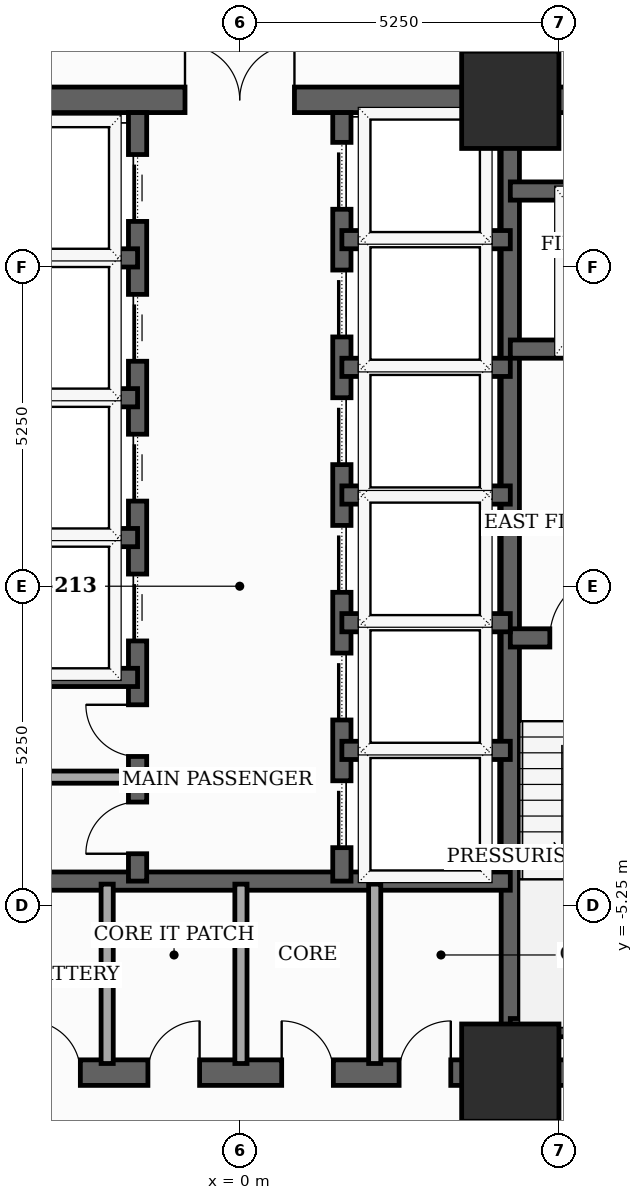
"""IFC4 building model, lengths in metres.
Left out: names, types, materials, properties, quantities, classifications, styles, units other than length and angle.
Written with IfcOpenShell. Run it as: python <this file> out.ifc"""

import sys

from ifc_helpers import new_model, si_unit, direction, frame, frame_2d, origin, origin_2d, place, context, subcontext, project, spatial, rectangle, extrude, element, fill, save


model = new_model("IFC4")
c1 = context("Model", 3, precision=1e-05, world=origin(), true_north=direction((0.0, 1.0)))
c2 = subcontext(c1, "Body", "Model", "MODEL_VIEW")
j1 = project(units=[si_unit("LENGTHUNIT", "METRE"), si_unit("PLANEANGLEUNIT", "RADIAN")], contexts=[c1])
p1 = place(None, origin())
s1 = spatial("IfcSite", under=j1, at=p1, CompositionType="ELEMENT")
p2 = place(p1, origin())
s2 = spatial("IfcBuilding", under=s1, at=p2, CompositionType="ELEMENT")
p3 = place(p2, frame((0.0, 0.0, 48.2)))
s3 = spatial("IfcBuildingStorey", under=s2, at=p3, CompositionType="ELEMENT", Elevation=48.2)
for number, where, z_axis, x_axis in (
    (1, (4.45, -8.0, 0.0), (0.0, 0.0, 1.0), (1.0, 0.0, 0.0)),
    (2, (4.45, 8.0, 0.0), (0.0, 0.0, 1.0), (1.0, 0.0, 0.0)),
):
    element("IfcColumn", number, at=place(p3, frame(where, z_axis=z_axis, x_axis=x_axis)), inside=s3, PredefinedType="COLUMN", context=c2, shape_type="SweptSolid", body=[
        extrude(rectangle(XDim=1.6, YDim=1.6, at=origin_2d()), origin(), (0.0, 0.0, 1.0), 3.7),
    ])
p4 = place(p3, frame((-8.0, -8.0, 0.0), z_axis=(0.0, 0.0, 1.0), x_axis=(1.0, 0.0, 0.0)))
e3 = element("IfcWall", 3, at=p4, inside=s3, PredefinedType="SHEAR", context=c2, shape_type="SweptSolid", body=[
    extrude(rectangle(XDim=16.0, YDim=0.42, at=frame_2d((8.0, 0.0))), origin(), (0.0, 0.0, 1.0), 3.5),
])
p5 = place(p4, frame((4.529, 0.0, 0.0)))
e4 = element("IfcOpeningElement", 4, at=p5, cuts=e3, PredefinedType="OPENING", context=c2, shape_type="SweptSolid", body=[
    extrude(rectangle(XDim=0.85, YDim=2.02, at=frame_2d((0.425, 1.01))), frame((0.0, 0.22, 0.0), z_axis=(0.0, -1.0, 0.0), x_axis=(1.0, 0.0, 0.0)), (0.0, 0.0, 1.0), 0.44),
])
p6 = place(p4, frame((6.49, 0.0, 0.0)))
e5 = element("IfcOpeningElement", 5, at=p6, cuts=e3, PredefinedType="OPENING", context=c2, shape_type="SweptSolid", body=[
    extrude(rectangle(XDim=0.85, YDim=2.02, at=frame_2d((0.425, 1.01))), frame((0.0, 0.22, 0.0), z_axis=(0.0, -1.0, 0.0), x_axis=(1.0, 0.0, 0.0)), (0.0, 0.0, 1.0), 0.44),
])
p7 = place(p4, frame((8.69, 0.0, 0.0)))
e6 = element("IfcOpeningElement", 6, at=p7, cuts=e3, PredefinedType="OPENING", context=c2, shape_type="SweptSolid", body=[
    extrude(rectangle(XDim=0.85, YDim=2.02, at=frame_2d((0.425, 1.01))), frame((0.0, 0.22, 0.0), z_axis=(0.0, -1.0, 0.0), x_axis=(1.0, 0.0, 0.0)), (0.0, 0.0, 1.0), 0.44),
])
p8 = place(p4, frame((10.621, 0.0, 0.0)))
e7 = element("IfcOpeningElement", 7, at=p8, cuts=e3, PredefinedType="OPENING", context=c2, shape_type="SweptSolid", body=[
    extrude(rectangle(XDim=0.85, YDim=2.02, at=frame_2d((0.425, 1.01))), frame((0.0, 0.22, 0.0), z_axis=(0.0, -1.0, 0.0), x_axis=(1.0, 0.0, 0.0)), (0.0, 0.0, 1.0), 0.44),
])
p9 = place(p3, frame((-8.0, 8.0, 0.0), z_axis=(0.0, 0.0, 1.0), x_axis=(1.0, 0.0, 0.0)))
e8 = element("IfcWall", 8, at=p9, inside=s3, PredefinedType="SHEAR", context=c2, shape_type="SweptSolid", body=[
    extrude(rectangle(XDim=16.0, YDim=0.42, at=frame_2d((8.0, 0.0))), origin(), (0.0, 0.0, 1.0), 3.5),
])
p10 = place(p9, frame((7.1, 0.0, 0.0)))
e9 = element("IfcOpeningElement", 9, at=p10, cuts=e8, PredefinedType="OPENING", context=c2, shape_type="SweptSolid", body=[
    extrude(rectangle(XDim=1.8, YDim=2.15, at=frame_2d((0.9, 1.075))), frame((0.0, 0.22, 0.0), z_axis=(0.0, -1.0, 0.0), x_axis=(1.0, 0.0, 0.0)), (0.0, 0.0, 1.0), 0.44),
])
p11 = place(p3, frame((4.45, -7.79, 0.0), z_axis=(0.0, 0.0, 1.0), x_axis=(0.0, 1.0, 0.0)))
e10 = element("IfcWall", 10, at=p11, inside=s3, PredefinedType="SHEAR", context=c2, shape_type="SweptSolid", body=[
    extrude(rectangle(XDim=15.58, YDim=0.3, at=frame_2d((7.79, 0.0))), origin(), (0.0, 0.0, 1.0), 3.5),
])
p12 = place(p3, frame((4.45, -0.85, 0.0), z_axis=(0.0, 0.0, 1.0), x_axis=(1.0, 0.0, 0.0)))
e11 = element("IfcWall", 11, at=p12, inside=s3, PredefinedType="SHEAR", context=c2, shape_type="SweptSolid", body=[
    extrude(rectangle(XDim=3.34, YDim=0.3, at=frame_2d((1.67, 0.0))), origin(), (0.0, 0.0, 1.0), 3.5),
])
p13 = place(p12, frame((0.65, 0.0, 0.0)))
e12 = element("IfcOpeningElement", 12, at=p13, cuts=e11, PredefinedType="OPENING", context=c2, shape_type="SweptSolid", body=[
    extrude(rectangle(XDim=1.05, YDim=2.15, at=frame_2d((0.525, 1.075))), frame((0.0, 0.16, 0.0), z_axis=(0.0, -1.0, 0.0), x_axis=(1.0, 0.0, 0.0)), (0.0, 0.0, 1.0), 0.32),
])
p14 = place(p3, frame((4.45, -7.26, 0.0), z_axis=(0.0, 0.0, 1.0), x_axis=(1.0, 0.0, 0.0)))
e13 = element("IfcWall", 13, at=p14, inside=s3, PredefinedType="SHEAR", context=c2, shape_type="SweptSolid", body=[
    extrude(rectangle(XDim=3.55, YDim=0.3, at=frame_2d((1.775, 0.0))), origin(), (0.0, 0.0, 1.0), 3.5),
])
p15 = place(p3, frame((4.45, 3.9, 0.0), z_axis=(0.0, 0.0, 1.0), x_axis=(1.0, 0.0, 0.0)))
e14 = element("IfcWall", 14, at=p15, inside=s3, PredefinedType="SHEAR", context=c2, shape_type="SweptSolid", body=[
    extrude(rectangle(XDim=3.34, YDim=0.3, at=frame_2d((1.67, 0.0))), origin(), (0.0, 0.0, 1.0), 3.5),
])
p16 = place(p15, frame((1.18, 0.0, 0.0)))
e15 = element("IfcOpeningElement", 15, at=p16, cuts=e14, PredefinedType="OPENING", context=c2, shape_type="SweptSolid", body=[
    extrude(rectangle(XDim=1.1, YDim=2.1, at=frame_2d((0.55, 1.05))), frame((0.0, 0.16, 0.0), z_axis=(0.0, -1.0, 0.0), x_axis=(1.0, 0.0, 0.0)), (0.0, 0.0, 1.0), 0.32),
])
p17 = place(p3, frame((4.45, 6.5, 0.0), z_axis=(0.0, 0.0, 1.0), x_axis=(1.0, 0.0, 0.0)))
e16 = element("IfcWall", 16, at=p17, inside=s3, PredefinedType="SHEAR", context=c2, shape_type="SweptSolid", body=[
    extrude(rectangle(XDim=3.34, YDim=0.3, at=frame_2d((1.67, 0.0))), origin(), (0.0, 0.0, 1.0), 3.5),
])
p18 = place(p3, frame((-4.45, -4.85, 0.0), z_axis=(0.0, 0.0, 1.0), x_axis=(1.0, 0.0, 0.0)))
e17 = element("IfcWall", 17, at=p18, inside=s3, PredefinedType="SHEAR", context=c2, shape_type="SweptSolid", body=[
    extrude(rectangle(XDim=8.9, YDim=0.3, at=frame_2d((4.45, 0.0))), origin(), (0.0, 0.0, 1.0), 3.5),
])
p19 = place(p3, frame((-1.68, -4.85, 0.0), z_axis=(0.0, 0.0, 1.0), x_axis=(0.0, 1.0, 0.0)))
e18 = element("IfcWall", 18, at=p19, inside=s3, PredefinedType="SHEAR", context=c2, shape_type="SweptSolid", body=[
    extrude(rectangle(XDim=12.64, YDim=0.3, at=frame_2d((6.32, 0.0))), origin(), (0.0, 0.0, 1.0), 3.5),
])
p20 = place(p19, frame((3.95, 0.0, 0.0)))
e19 = element("IfcOpeningElement", 19, at=p20, cuts=e18, PredefinedType="OPENING", context=c2, shape_type="SweptSolid", body=[
    extrude(rectangle(XDim=1.1, YDim=2.1, at=frame_2d((0.55, 1.05))), frame((0.0, 0.16, 0.0), z_axis=(0.0, -1.0, 0.0), x_axis=(1.0, 0.0, 0.0)), (0.0, 0.0, 1.0), 0.32),
])
p21 = place(p19, frame((6.25, 0.0, 0.0)))
e20 = element("IfcOpeningElement", 20, at=p21, cuts=e18, PredefinedType="OPENING", context=c2, shape_type="SweptSolid", body=[
    extrude(rectangle(XDim=1.1, YDim=2.1, at=frame_2d((0.55, 1.05))), frame((0.0, 0.16, 0.0), z_axis=(0.0, -1.0, 0.0), x_axis=(1.0, 0.0, 0.0)), (0.0, 0.0, 1.0), 0.32),
])
p22 = place(p19, frame((8.55, 0.0, 0.0)))
e21 = element("IfcOpeningElement", 21, at=p22, cuts=e18, PredefinedType="OPENING", context=c2, shape_type="SweptSolid", body=[
    extrude(rectangle(XDim=1.1, YDim=2.1, at=frame_2d((0.55, 1.05))), frame((0.0, 0.16, 0.0), z_axis=(0.0, -1.0, 0.0), x_axis=(1.0, 0.0, 0.0)), (0.0, 0.0, 1.0), 0.32),
])
p23 = place(p19, frame((10.85, 0.0, 0.0)))
e22 = element("IfcOpeningElement", 22, at=p23, cuts=e18, PredefinedType="OPENING", context=c2, shape_type="SweptSolid", body=[
    extrude(rectangle(XDim=1.1, YDim=2.1, at=frame_2d((0.55, 1.05))), frame((0.0, 0.16, 0.0), z_axis=(0.0, -1.0, 0.0), x_axis=(1.0, 0.0, 0.0)), (0.0, 0.0, 1.0), 0.32),
])
p24 = place(p19, frame((0.45, 0.0, 0.0)))
e23 = element("IfcOpeningElement", 23, at=p24, cuts=e18, PredefinedType="OPENING", context=c2, shape_type="SweptSolid", body=[
    extrude(rectangle(XDim=0.85, YDim=2.02, at=frame_2d((0.425, 1.01))), frame((0.0, 0.16, 0.0), z_axis=(0.0, -1.0, 0.0), x_axis=(1.0, 0.0, 0.0)), (0.0, 0.0, 1.0), 0.32),
])
p25 = place(p19, frame((2.05, 0.0, 0.0)))
e24 = element("IfcOpeningElement", 24, at=p25, cuts=e18, PredefinedType="OPENING", context=c2, shape_type="SweptSolid", body=[
    extrude(rectangle(XDim=0.85, YDim=2.02, at=frame_2d((0.425, 1.01))), frame((0.0, 0.16, 0.0), z_axis=(0.0, -1.0, 0.0), x_axis=(1.0, 0.0, 0.0)), (0.0, 0.0, 1.0), 0.32),
])
p26 = place(p3, frame((1.68, -4.85, 0.0), z_axis=(0.0, 0.0, 1.0), x_axis=(0.0, 1.0, 0.0)))
e25 = element("IfcWall", 25, at=p26, inside=s3, PredefinedType="SHEAR", context=c2, shape_type="SweptSolid", body=[
    extrude(rectangle(XDim=12.64, YDim=0.3, at=frame_2d((6.32, 0.0))), origin(), (0.0, 0.0, 1.0), 3.5),
])
p27 = place(p26, frame((0.55, 0.0, 0.0)))
e26 = element("IfcOpeningElement", 26, at=p27, cuts=e25, PredefinedType="OPENING", context=c2, shape_type="SweptSolid", body=[
    extrude(rectangle(XDim=1.1, YDim=2.1, at=frame_2d((0.55, 1.05))), frame((0.0, 0.16, 0.0), z_axis=(0.0, -1.0, 0.0), x_axis=(1.0, 0.0, 0.0)), (0.0, 0.0, 1.0), 0.32),
])
p28 = place(p26, frame((2.65, 0.0, 0.0)))
e27 = element("IfcOpeningElement", 27, at=p28, cuts=e25, PredefinedType="OPENING", context=c2, shape_type="SweptSolid", body=[
    extrude(rectangle(XDim=1.1, YDim=2.1, at=frame_2d((0.55, 1.05))), frame((0.0, 0.16, 0.0), z_axis=(0.0, -1.0, 0.0), x_axis=(1.0, 0.0, 0.0)), (0.0, 0.0, 1.0), 0.32),
])
p29 = place(p26, frame((4.75, 0.0, 0.0)))
e28 = element("IfcOpeningElement", 28, at=p29, cuts=e25, PredefinedType="OPENING", context=c2, shape_type="SweptSolid", body=[
    extrude(rectangle(XDim=1.1, YDim=2.1, at=frame_2d((0.55, 1.05))), frame((0.0, 0.16, 0.0), z_axis=(0.0, -1.0, 0.0), x_axis=(1.0, 0.0, 0.0)), (0.0, 0.0, 1.0), 0.32),
])
p30 = place(p26, frame((6.85, 0.0, 0.0)))
e29 = element("IfcOpeningElement", 29, at=p30, cuts=e25, PredefinedType="OPENING", context=c2, shape_type="SweptSolid", body=[
    extrude(rectangle(XDim=1.1, YDim=2.1, at=frame_2d((0.55, 1.05))), frame((0.0, 0.16, 0.0), z_axis=(0.0, -1.0, 0.0), x_axis=(1.0, 0.0, 0.0)), (0.0, 0.0, 1.0), 0.32),
])
p31 = place(p26, frame((8.95, 0.0, 0.0)))
e30 = element("IfcOpeningElement", 30, at=p31, cuts=e25, PredefinedType="OPENING", context=c2, shape_type="SweptSolid", body=[
    extrude(rectangle(XDim=1.1, YDim=2.1, at=frame_2d((0.55, 1.05))), frame((0.0, 0.16, 0.0), z_axis=(0.0, -1.0, 0.0), x_axis=(1.0, 0.0, 0.0)), (0.0, 0.0, 1.0), 0.32),
])
p32 = place(p26, frame((11.05, 0.0, 0.0)))
e31 = element("IfcOpeningElement", 31, at=p32, cuts=e25, PredefinedType="OPENING", context=c2, shape_type="SweptSolid", body=[
    extrude(rectangle(XDim=1.1, YDim=2.1, at=frame_2d((0.55, 1.05))), frame((0.0, 0.16, 0.0), z_axis=(0.0, -1.0, 0.0), x_axis=(1.0, 0.0, 0.0)), (0.0, 0.0, 1.0), 0.32),
])
for number, where, z_axis, x_axis in (
    (32, (-4.45, -1.5, 0.0), (0.0, 0.0, 1.0), (1.0, 0.0, 0.0)),
    (33, (-4.45, 0.8, 0.0), (0.0, 0.0, 1.0), (1.0, 0.0, 0.0)),
    (34, (-4.45, 3.1, 0.0), (0.0, 0.0, 1.0), (1.0, 0.0, 0.0)),
    (35, (-4.45, 5.4, 0.0), (0.0, 0.0, 1.0), (1.0, 0.0, 0.0)),
    (36, (1.68, 1.5, 0.0), (0.0, 0.0, 1.0), (1.0, 0.0, 0.0)),
    (37, (1.68, 3.6, 0.0), (0.0, 0.0, 1.0), (1.0, 0.0, 0.0)),
    (38, (1.68, 5.7, 0.0), (0.0, 0.0, 1.0), (1.0, 0.0, 0.0)),
    (39, (1.68, -2.7, 0.0), (0.0, 0.0, 1.0), (1.0, 0.0, 0.0)),
    (40, (1.68, -0.6, 0.0), (0.0, 0.0, 1.0), (1.0, 0.0, 0.0)),
):
    element("IfcWall", number, at=place(p3, frame(where, z_axis=z_axis, x_axis=x_axis)), inside=s3, PredefinedType="SHEAR", context=c2, shape_type="SweptSolid", body=[
        extrude(rectangle(XDim=2.77, YDim=0.3, at=frame_2d((1.385, 0.0))), origin(), (0.0, 0.0, 1.0), 3.5),
    ])
for number, where, z_axis, x_axis in (
    (41, (-2.18, -7.85, 0.0), (0.0, 0.0, 1.0), (0.0, 1.0, 0.0)),
    (42, (0.02, -7.85, 0.0), (0.0, 0.0, 1.0), (0.0, 1.0, 0.0)),
    (43, (2.22, -7.85, 0.0), (0.0, 0.0, 1.0), (0.0, 1.0, 0.0)),
):
    element("IfcWall", number, at=place(p3, frame(where, z_axis=z_axis, x_axis=x_axis)), inside=s3, PredefinedType="SOLIDWALL", context=c2, shape_type="SweptSolid", body=[
        extrude(rectangle(XDim=2.95, YDim=0.2, at=frame_2d((1.475, 0.0))), origin(), (0.0, 0.0, 1.0), 2.885),
    ])
p33 = place(p3, frame((-4.4, -3.14, 0.0), z_axis=(0.0, 0.0, 1.0), x_axis=(1.0, 0.0, 0.0)))
e44 = element("IfcWall", 44, at=p33, inside=s3, PredefinedType="SOLIDWALL", context=c2, shape_type="SweptSolid", body=[
    extrude(rectangle(XDim=2.68, YDim=0.2, at=frame_2d((1.34, 0.0))), origin(), (0.0, 0.0, 1.0), 3.5),
])
p34 = place(p5, origin())
e45 = element("IfcDoor", 45, at=p34, inside=s3, OperationType="SINGLE_SWING_LEFT", PredefinedType="TRAPDOOR", context=c2, shape_type="SweptSolid", body=[
    extrude(rectangle(XDim=0.85, YDim=2.02, at=frame_2d((0.425, 1.01))), frame((0.0, 0.025, 0.0), z_axis=(0.0, -1.0, 0.0), x_axis=(1.0, 0.0, 0.0)), (0.0, 0.0, 1.0), 0.05),
])
fill(e4, e45)
p35 = place(p6, origin())
e46 = element("IfcDoor", 46, at=p35, inside=s3, OperationType="SINGLE_SWING_RIGHT", PredefinedType="TRAPDOOR", context=c2, shape_type="SweptSolid", body=[
    extrude(rectangle(XDim=0.85, YDim=2.02, at=frame_2d((0.425, 1.01))), frame((0.0, 0.025, 0.0), z_axis=(0.0, -1.0, 0.0), x_axis=(1.0, 0.0, 0.0)), (0.0, 0.0, 1.0), 0.05),
])
fill(e5, e46)
p36 = place(p7, origin())
e47 = element("IfcDoor", 47, at=p36, inside=s3, OperationType="SINGLE_SWING_LEFT", PredefinedType="TRAPDOOR", context=c2, shape_type="SweptSolid", body=[
    extrude(rectangle(XDim=0.85, YDim=2.02, at=frame_2d((0.425, 1.01))), frame((0.0, 0.025, 0.0), z_axis=(0.0, -1.0, 0.0), x_axis=(1.0, 0.0, 0.0)), (0.0, 0.0, 1.0), 0.05),
])
fill(e6, e47)
p37 = place(p8, origin())
e48 = element("IfcDoor", 48, at=p37, inside=s3, OperationType="SINGLE_SWING_RIGHT", PredefinedType="TRAPDOOR", context=c2, shape_type="SweptSolid", body=[
    extrude(rectangle(XDim=0.85, YDim=2.02, at=frame_2d((0.425, 1.01))), frame((0.0, 0.025, 0.0), z_axis=(0.0, -1.0, 0.0), x_axis=(1.0, 0.0, 0.0)), (0.0, 0.0, 1.0), 0.05),
])
fill(e7, e48)
p38 = place(p10, origin())
e49 = element("IfcDoor", 49, at=p38, inside=s3, OperationType="DOUBLE_DOOR_SINGLE_SWING", PredefinedType="DOOR", context=c2, shape_type="SweptSolid", body=[
    extrude(rectangle(XDim=1.8, YDim=2.15, at=frame_2d((0.9, 1.075))), frame((0.0, 0.025, 0.0), z_axis=(0.0, -1.0, 0.0), x_axis=(1.0, 0.0, 0.0)), (0.0, 0.0, 1.0), 0.05),
])
fill(e9, e49)
p39 = place(p13, origin())
e50 = element("IfcDoor", 50, at=p39, inside=s3, OperationType="SINGLE_SWING_RIGHT", PredefinedType="DOOR", context=c2, shape_type="SweptSolid", body=[
    extrude(rectangle(XDim=1.05, YDim=2.15, at=frame_2d((0.525, 1.075))), frame((0.0, 0.025, 0.0), z_axis=(0.0, -1.0, 0.0), x_axis=(1.0, 0.0, 0.0)), (0.0, 0.0, 1.0), 0.05),
])
fill(e12, e50)
p40 = place(p20, origin())
e51 = element("IfcDoor", 51, at=p40, inside=s3, OperationType="SLIDING_TO_LEFT", PredefinedType="DOOR", context=c2, shape_type="SweptSolid", body=[
    extrude(rectangle(XDim=1.1, YDim=2.1, at=frame_2d((0.55, 1.05))), frame((0.0, 0.025, 0.0), z_axis=(0.0, -1.0, 0.0), x_axis=(1.0, 0.0, 0.0)), (0.0, 0.0, 1.0), 0.05),
])
fill(e19, e51)
p41 = place(p21, origin())
e52 = element("IfcDoor", 52, at=p41, inside=s3, OperationType="SLIDING_TO_LEFT", PredefinedType="DOOR", context=c2, shape_type="SweptSolid", body=[
    extrude(rectangle(XDim=1.1, YDim=2.1, at=frame_2d((0.55, 1.05))), frame((0.0, 0.025, 0.0), z_axis=(0.0, -1.0, 0.0), x_axis=(1.0, 0.0, 0.0)), (0.0, 0.0, 1.0), 0.05),
])
fill(e20, e52)
p42 = place(p22, origin())
e53 = element("IfcDoor", 53, at=p42, inside=s3, OperationType="SLIDING_TO_LEFT", PredefinedType="DOOR", context=c2, shape_type="SweptSolid", body=[
    extrude(rectangle(XDim=1.1, YDim=2.1, at=frame_2d((0.55, 1.05))), frame((0.0, 0.025, 0.0), z_axis=(0.0, -1.0, 0.0), x_axis=(1.0, 0.0, 0.0)), (0.0, 0.0, 1.0), 0.05),
])
fill(e21, e53)
p43 = place(p23, origin())
e54 = element("IfcDoor", 54, at=p43, inside=s3, OperationType="SLIDING_TO_LEFT", PredefinedType="DOOR", context=c2, shape_type="SweptSolid", body=[
    extrude(rectangle(XDim=1.1, YDim=2.1, at=frame_2d((0.55, 1.05))), frame((0.0, 0.025, 0.0), z_axis=(0.0, -1.0, 0.0), x_axis=(1.0, 0.0, 0.0)), (0.0, 0.0, 1.0), 0.05),
])
fill(e22, e54)
p44 = place(p24, origin())
e55 = element("IfcDoor", 55, at=p44, inside=s3, OperationType="SINGLE_SWING_LEFT", PredefinedType="TRAPDOOR", context=c2, shape_type="SweptSolid", body=[
    extrude(rectangle(XDim=0.85, YDim=2.02, at=frame_2d((0.425, 1.01))), frame((0.0, 0.025, 0.0), z_axis=(0.0, -1.0, 0.0), x_axis=(1.0, 0.0, 0.0)), (0.0, 0.0, 1.0), 0.05),
])
fill(e23, e55)
p45 = place(p25, origin())
e56 = element("IfcDoor", 56, at=p45, inside=s3, OperationType="SINGLE_SWING_RIGHT", PredefinedType="TRAPDOOR", context=c2, shape_type="SweptSolid", body=[
    extrude(rectangle(XDim=0.85, YDim=2.02, at=frame_2d((0.425, 1.01))), frame((0.0, 0.025, 0.0), z_axis=(0.0, -1.0, 0.0), x_axis=(1.0, 0.0, 0.0)), (0.0, 0.0, 1.0), 0.05),
])
fill(e24, e56)
p46 = place(p27, origin())
e57 = element("IfcDoor", 57, at=p46, inside=s3, OperationType="SLIDING_TO_LEFT", PredefinedType="DOOR", context=c2, shape_type="SweptSolid", body=[
    extrude(rectangle(XDim=1.1, YDim=2.1, at=frame_2d((0.55, 1.05))), frame((0.0, 0.025, 0.0), z_axis=(0.0, -1.0, 0.0), x_axis=(1.0, 0.0, 0.0)), (0.0, 0.0, 1.0), 0.05),
])
fill(e26, e57)
p47 = place(p28, origin())
e58 = element("IfcDoor", 58, at=p47, inside=s3, OperationType="SLIDING_TO_LEFT", PredefinedType="DOOR", context=c2, shape_type="SweptSolid", body=[
    extrude(rectangle(XDim=1.1, YDim=2.1, at=frame_2d((0.55, 1.05))), frame((0.0, 0.025, 0.0), z_axis=(0.0, -1.0, 0.0), x_axis=(1.0, 0.0, 0.0)), (0.0, 0.0, 1.0), 0.05),
])
fill(e27, e58)
p48 = place(p29, origin())
e59 = element("IfcDoor", 59, at=p48, inside=s3, OperationType="SLIDING_TO_LEFT", PredefinedType="DOOR", context=c2, shape_type="SweptSolid", body=[
    extrude(rectangle(XDim=1.1, YDim=2.1, at=frame_2d((0.55, 1.05))), frame((0.0, 0.025, 0.0), z_axis=(0.0, -1.0, 0.0), x_axis=(1.0, 0.0, 0.0)), (0.0, 0.0, 1.0), 0.05),
])
fill(e28, e59)
p49 = place(p30, origin())
e60 = element("IfcDoor", 60, at=p49, inside=s3, OperationType="SLIDING_TO_LEFT", PredefinedType="DOOR", context=c2, shape_type="SweptSolid", body=[
    extrude(rectangle(XDim=1.1, YDim=2.1, at=frame_2d((0.55, 1.05))), frame((0.0, 0.025, 0.0), z_axis=(0.0, -1.0, 0.0), x_axis=(1.0, 0.0, 0.0)), (0.0, 0.0, 1.0), 0.05),
])
fill(e29, e60)
p50 = place(p31, origin())
e61 = element("IfcDoor", 61, at=p50, inside=s3, OperationType="SLIDING_TO_LEFT", PredefinedType="DOOR", context=c2, shape_type="SweptSolid", body=[
    extrude(rectangle(XDim=1.1, YDim=2.1, at=frame_2d((0.55, 1.05))), frame((0.0, 0.025, 0.0), z_axis=(0.0, -1.0, 0.0), x_axis=(1.0, 0.0, 0.0)), (0.0, 0.0, 1.0), 0.05),
])
fill(e30, e61)
p51 = place(p32, origin())
e62 = element("IfcDoor", 62, at=p51, inside=s3, OperationType="SLIDING_TO_LEFT", PredefinedType="DOOR", context=c2, shape_type="SweptSolid", body=[
    extrude(rectangle(XDim=1.1, YDim=2.1, at=frame_2d((0.55, 1.05))), frame((0.0, 0.025, 0.0), z_axis=(0.0, -1.0, 0.0), x_axis=(1.0, 0.0, 0.0)), (0.0, 0.0, 1.0), 0.05),
])
fill(e31, e62)
save(model, sys.argv[1])
